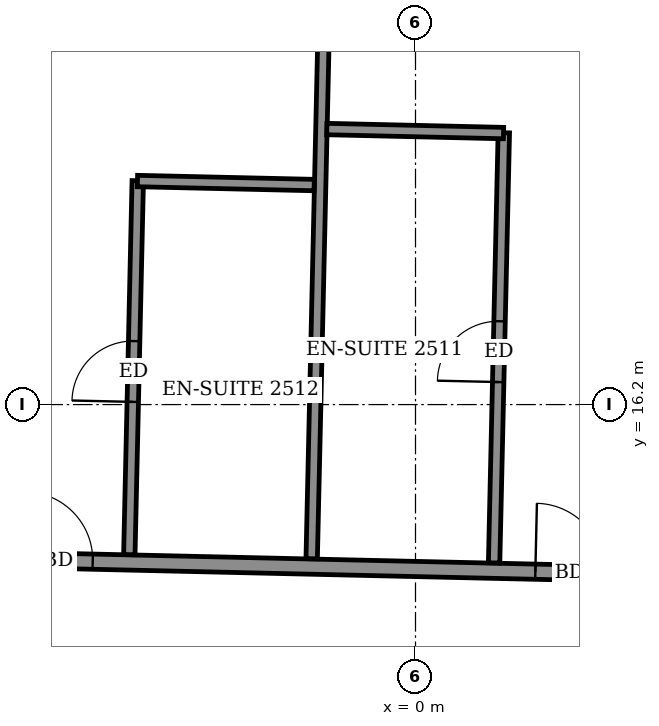
"""IFC4 building model, lengths in metres.
Left out: names, types, materials, properties, quantities, classifications, styles, units other than length and angle.
Written with IfcOpenShell. Run it as: python <this file> out.ifc"""

import sys

from ifc_helpers import new_model, si_unit, direction, frame, frame_2d, origin, place, context, subcontext, project, spatial, rectangle, extrude, element, fill, save


model = new_model("IFC4")
c1 = context("Model", 3, precision=1e-05, world=origin(), true_north=direction((0.0, 1.0)))
c2 = subcontext(c1, "Body", "Model", "MODEL_VIEW")
j1 = project(units=[si_unit("LENGTHUNIT", "METRE"), si_unit("PLANEANGLEUNIT", "RADIAN")], contexts=[c1])
p1 = place(None, origin())
s1 = spatial("IfcSite", under=j1, at=p1, CompositionType="ELEMENT")
p2 = place(p1, origin())
s2 = spatial("IfcBuilding", under=s1, at=p2, CompositionType="ELEMENT")
p3 = place(p2, frame((0.0, 0.0, 101.9)))
s3 = spatial("IfcBuildingStorey", under=s2, at=p3, CompositionType="ELEMENT", Elevation=101.9)
p4 = place(p3, frame((-26.316, 14.634, 0.0), z_axis=(0.0, 0.0, 1.0), x_axis=(0.999742734556, -0.02268181435, 0.0)))
e1 = element("IfcWall", 1, at=p4, inside=s3, PredefinedType="PARTITIONING", context=c2, shape_type="SweptSolid", body=[
    extrude(rectangle(XDim=50.708, YDim=0.2, at=frame_2d((25.354, 0.0))), origin(), (0.0, 0.0, 1.0), 3.05),
])
p5 = place(p4, frame((48.229, 0.0, 0.0)))
e2 = element("IfcOpeningElement", 2, at=p5, cuts=e1, PredefinedType="OPENING", context=c2, shape_type="SweptSolid", body=[
    extrude(rectangle(XDim=1.0, YDim=2.1, at=frame_2d((0.5, 1.05))), frame((0.0, 0.11, 0.0), z_axis=(0.0, -1.0, 0.0), x_axis=(1.0, 0.0, 0.0)), (0.0, 0.0, 1.0), 0.22),
])
p6 = place(p4, frame((43.6, 0.0, 0.0)))
e3 = element("IfcOpeningElement", 3, at=p6, cuts=e1, PredefinedType="OPENING", context=c2, shape_type="SweptSolid", body=[
    extrude(rectangle(XDim=0.9, YDim=2.1, at=frame_2d((0.45, 1.05))), frame((0.0, 0.11, 0.0), z_axis=(0.0, -1.0, 0.0), x_axis=(1.0, 0.0, 0.0)), (0.0, 0.0, 1.0), 0.22),
])
p7 = place(p4, frame((38.925, 0.0, 0.0)))
e4 = element("IfcOpeningElement", 4, at=p7, cuts=e1, PredefinedType="OPENING", context=c2, shape_type="SweptSolid", body=[
    extrude(rectangle(XDim=0.9, YDim=2.1, at=frame_2d((0.45, 1.05))), frame((0.0, 0.11, 0.0), z_axis=(0.0, -1.0, 0.0), x_axis=(1.0, 0.0, 0.0)), (0.0, 0.0, 1.0), 0.22),
])
p8 = place(p4, frame((36.9, 0.0, 0.0)))
e5 = element("IfcOpeningElement", 5, at=p8, cuts=e1, PredefinedType="OPENING", context=c2, shape_type="SweptSolid", body=[
    extrude(rectangle(XDim=0.9, YDim=2.1, at=frame_2d((0.45, 1.05))), frame((0.0, 0.11, 0.0), z_axis=(0.0, -1.0, 0.0), x_axis=(1.0, 0.0, 0.0)), (0.0, 0.0, 1.0), 0.22),
])
p9 = place(p4, frame((29.975, 0.0, 0.0)))
e6 = element("IfcOpeningElement", 6, at=p9, cuts=e1, PredefinedType="OPENING", context=c2, shape_type="SweptSolid", body=[
    extrude(rectangle(XDim=0.9, YDim=2.1, at=frame_2d((0.45, 1.05))), frame((0.0, 0.11, 0.0), z_axis=(0.0, -1.0, 0.0), x_axis=(1.0, 0.0, 0.0)), (0.0, 0.0, 1.0), 0.22),
])
p10 = place(p4, frame((27.9, 0.0, 0.0)))
e7 = element("IfcOpeningElement", 7, at=p10, cuts=e1, PredefinedType="OPENING", context=c2, shape_type="SweptSolid", body=[
    extrude(rectangle(XDim=0.9, YDim=2.1, at=frame_2d((0.45, 1.05))), frame((0.0, 0.11, 0.0), z_axis=(0.0, -1.0, 0.0), x_axis=(1.0, 0.0, 0.0)), (0.0, 0.0, 1.0), 0.22),
])
p11 = place(p4, frame((21.175, 0.0, 0.0)))
e8 = element("IfcOpeningElement", 8, at=p11, cuts=e1, PredefinedType="OPENING", context=c2, shape_type="SweptSolid", body=[
    extrude(rectangle(XDim=0.9, YDim=2.1, at=frame_2d((0.45, 1.05))), frame((0.0, 0.11, 0.0), z_axis=(0.0, -1.0, 0.0), x_axis=(1.0, 0.0, 0.0)), (0.0, 0.0, 1.0), 0.22),
])
p12 = place(p4, frame((19.25, 0.0, 0.0)))
e9 = element("IfcOpeningElement", 9, at=p12, cuts=e1, PredefinedType="OPENING", context=c2, shape_type="SweptSolid", body=[
    extrude(rectangle(XDim=0.9, YDim=2.1, at=frame_2d((0.45, 1.05))), frame((0.0, 0.11, 0.0), z_axis=(0.0, -1.0, 0.0), x_axis=(1.0, 0.0, 0.0)), (0.0, 0.0, 1.0), 0.22),
])
p13 = place(p4, frame((12.375, 0.0, 0.0)))
e10 = element("IfcOpeningElement", 10, at=p13, cuts=e1, PredefinedType="OPENING", context=c2, shape_type="SweptSolid", body=[
    extrude(rectangle(XDim=0.9, YDim=2.1, at=frame_2d((0.45, 1.05))), frame((0.0, 0.11, 0.0), z_axis=(0.0, -1.0, 0.0), x_axis=(1.0, 0.0, 0.0)), (0.0, 0.0, 1.0), 0.22),
])
p14 = place(p4, frame((10.225, 0.0, 0.0)))
e11 = element("IfcOpeningElement", 11, at=p14, cuts=e1, PredefinedType="OPENING", context=c2, shape_type="SweptSolid", body=[
    extrude(rectangle(XDim=0.9, YDim=2.1, at=frame_2d((0.45, 1.05))), frame((0.0, 0.11, 0.0), z_axis=(0.0, -1.0, 0.0), x_axis=(1.0, 0.0, 0.0)), (0.0, 0.0, 1.0), 0.22),
])
p15 = place(p4, frame((0.85, 0.0, 0.0)))
e12 = element("IfcOpeningElement", 12, at=p15, cuts=e1, PredefinedType="OPENING", context=c2, shape_type="SweptSolid", body=[
    extrude(rectangle(XDim=1.0, YDim=2.1, at=frame_2d((0.5, 1.05))), frame((0.0, 0.11, 0.0), z_axis=(0.0, -1.0, 0.0), x_axis=(1.0, 0.0, 0.0)), (0.0, 0.0, 1.0), 0.22),
])
p16 = place(p4, frame((5.55, 0.0, 0.0)))
e13 = element("IfcOpeningElement", 13, at=p16, cuts=e1, PredefinedType="OPENING", context=c2, shape_type="SweptSolid", body=[
    extrude(rectangle(XDim=0.9, YDim=2.1, at=frame_2d((0.45, 1.05))), frame((0.0, 0.11, 0.0), z_axis=(0.0, -1.0, 0.0), x_axis=(1.0, 0.0, 0.0)), (0.0, 0.0, 1.0), 0.22),
])
p17 = place(p3, frame((-3.765, 14.226, 0.0), z_axis=(0.0, 0.0, 1.0), x_axis=(0.022527535496, 0.999746222871, 0.0)))
e14 = element("IfcWall", 14, at=p17, inside=s3, PredefinedType="PARTITIONING", context=c2, shape_type="SweptSolid", body=[
    extrude(rectangle(XDim=4.92, YDim=0.15, at=frame_2d((2.46, 0.0))), origin(), (0.0, 0.0, 1.0), 3.05),
])
p18 = place(p17, frame((2.01, 0.0, 0.0)))
e15 = element("IfcOpeningElement", 15, at=p18, cuts=e14, PredefinedType="OPENING", context=c2, shape_type="SweptSolid", body=[
    extrude(rectangle(XDim=0.8, YDim=2.1, at=frame_2d((0.4, 1.05))), frame((0.0, 0.085, 0.0), z_axis=(0.0, -1.0, 0.0), x_axis=(1.0, 0.0, 0.0)), (0.0, 0.0, 1.0), 0.17),
])
p19 = place(p3, frame((-1.366, 14.172, 0.0), z_axis=(0.0, 0.0, 1.0), x_axis=(0.022687206857, 0.999742612198, 0.0)))
e16 = element("IfcWall", 16, at=p19, inside=s3, PredefinedType="PARTITIONING", context=c2, shape_type="SweptSolid", body=[
    extrude(rectangle(XDim=11.676, YDim=0.15, at=frame_2d((5.838, 0.0))), origin(), (0.0, 0.0, 1.0), 2.55),
])
p20 = place(p3, frame((1.034, 14.117, 0.0), z_axis=(0.0, 0.0, 1.0), x_axis=(0.022644004729, 0.999743591652, 0.0)))
e17 = element("IfcWall", 17, at=p20, inside=s3, PredefinedType="PARTITIONING", context=c2, shape_type="SweptSolid", body=[
    extrude(rectangle(XDim=5.66, YDim=0.15, at=frame_2d((2.83, 0.0))), origin(), (0.0, 0.0, 1.0), 3.05),
])
p21 = place(p20, frame((2.38, 0.0, 0.0)))
e18 = element("IfcOpeningElement", 18, at=p21, cuts=e17, PredefinedType="OPENING", context=c2, shape_type="SweptSolid", body=[
    extrude(rectangle(XDim=0.8, YDim=2.1, at=frame_2d((0.4, 1.05))), frame((0.0, 0.085, 0.0), z_axis=(0.0, -1.0, 0.0), x_axis=(1.0, 0.0, 0.0)), (0.0, 0.0, 1.0), 0.17),
])
for number, where, z_axis, x_axis in (
    (19, (-3.658, 19.141, 0.0), (0.0, 0.0, 1.0), (1.0, -0.023, 0.0)),
    (20, (-1.167, 19.825, 0.0), (0.0, 0.0, 1.0), (1.0, -0.023, 0.0)),
):
    element("IfcWall", number, at=place(p3, frame(where, z_axis=z_axis, x_axis=x_axis)), inside=s3, PredefinedType="PARTITIONING", context=c2, shape_type="SweptSolid", body=[
        extrude(rectangle(XDim=2.325, YDim=0.15, at=frame_2d((1.163, 0.0))), origin(), (0.0, 0.0, 1.0), 3.05),
    ])
p22 = place(p10, origin())
e21 = element("IfcDoor", 21, at=p22, inside=s3, OperationType="SINGLE_SWING_LEFT", PredefinedType="DOOR", context=c2, shape_type="SweptSolid", body=[
    extrude(rectangle(XDim=0.9, YDim=2.1, at=frame_2d((0.45, 1.05))), frame((0.0, 0.025, 0.0), z_axis=(0.0, -1.0, 0.0), x_axis=(1.0, 0.0, 0.0)), (0.0, 0.0, 1.0), 0.05),
])
fill(e7, e21)
p23 = place(p21, origin())
e22 = element("IfcDoor", 22, at=p23, inside=s3, OperationType="SINGLE_SWING_LEFT", PredefinedType="DOOR", context=c2, shape_type="SweptSolid", body=[
    extrude(rectangle(XDim=0.8, YDim=2.1, at=frame_2d((0.4, 1.05))), frame((0.0, 0.025, 0.0), z_axis=(0.0, -1.0, 0.0), x_axis=(1.0, 0.0, 0.0)), (0.0, 0.0, 1.0), 0.05),
])
fill(e18, e22)
p24 = place(p11, origin())
e23 = element("IfcDoor", 23, at=p24, inside=s3, OperationType="SINGLE_SWING_RIGHT", PredefinedType="DOOR", context=c2, shape_type="SweptSolid", body=[
    extrude(rectangle(XDim=0.9, YDim=2.1, at=frame_2d((0.45, 1.05))), frame((0.0, 0.025, 0.0), z_axis=(0.0, -1.0, 0.0), x_axis=(1.0, 0.0, 0.0)), (0.0, 0.0, 1.0), 0.05),
])
fill(e8, e23)
p25 = place(p18, origin())
e24 = element("IfcDoor", 24, at=p25, inside=s3, OperationType="SINGLE_SWING_RIGHT", PredefinedType="DOOR", context=c2, shape_type="SweptSolid", body=[
    extrude(rectangle(XDim=0.8, YDim=2.1, at=frame_2d((0.4, 1.05))), frame((0.0, 0.025, 0.0), z_axis=(0.0, -1.0, 0.0), x_axis=(1.0, 0.0, 0.0)), (0.0, 0.0, 1.0), 0.05),
])
fill(e15, e24)
save(model, sys.argv[1])
